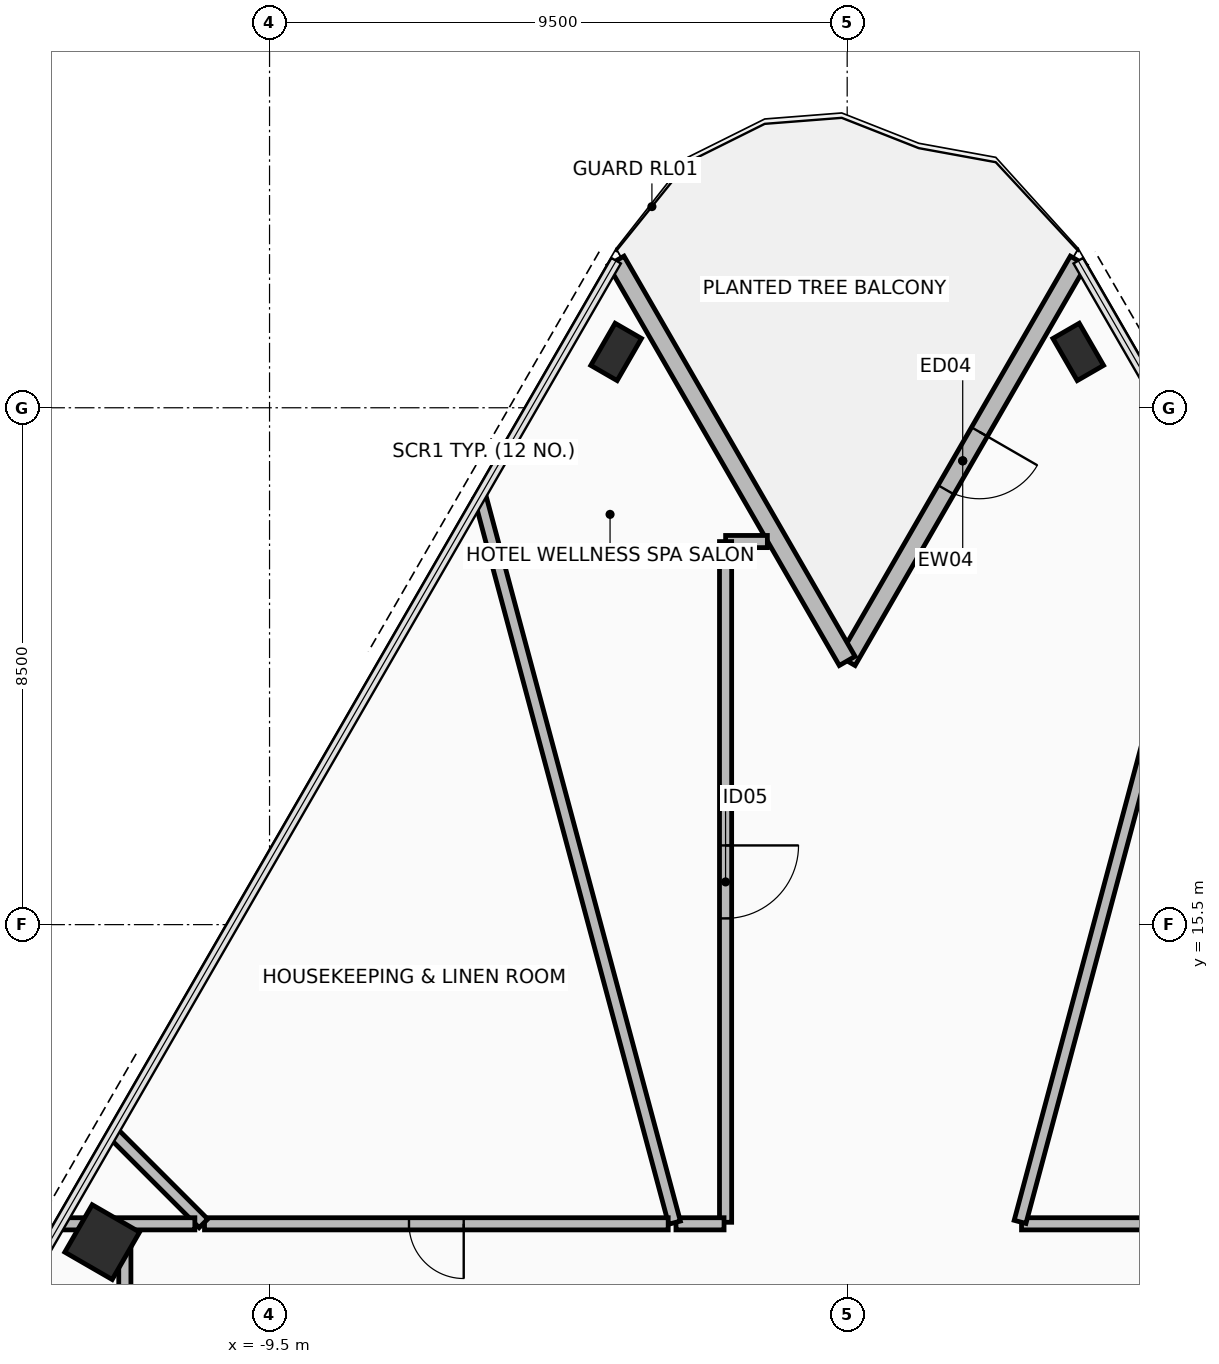
"""IFC4 building model, lengths in metres.
Left out: names, types, materials, properties, quantities, classifications, styles, units other than length and angle.
Written with IfcOpenShell. Run it as: python <this file> out.ifc"""

import sys

from ifc_helpers import new_model, si_unit, direction, frame, frame_2d, origin, origin_2d, place, context, subcontext, project, spatial, rectangle, hollow_rectangle, extrude, element, fill, save


model = new_model("IFC4")
c1 = context("Model", 3, precision=1e-05, world=origin(), true_north=direction((0.0, 1.0)))
c2 = subcontext(c1, "Body", "Model", "MODEL_VIEW")
j1 = project(units=[si_unit("LENGTHUNIT", "METRE"), si_unit("PLANEANGLEUNIT", "RADIAN")], contexts=[c1])
p1 = place(None, origin())
s1 = spatial("IfcSite", under=j1, at=p1, CompositionType="ELEMENT")
p2 = place(p1, origin())
s2 = spatial("IfcBuilding", under=s1, at=p2, CompositionType="ELEMENT")
p3 = place(p2, frame((0.0, 0.0, 52.25)))
s3 = spatial("IfcBuildingStorey", under=s2, at=p3, CompositionType="ELEMENT", Elevation=52.25)
p4 = place(p3, frame((-3.8, 24.918, 0.0), z_axis=(0.0, 0.0, 1.0), x_axis=(0.500001511499, 0.866024531118, 0.0)))
e1 = element("IfcColumn", 1, at=p4, inside=s3, PredefinedType="COLUMN", context=c2, shape_type="SweptSolid", body=[
    extrude(hollow_rectangle(XDim=0.5, YDim=0.8, WallThickness=0.04, at=origin_2d()), origin(), (0.0, 0.0, 1.0), 4.75),
])
p5 = place(p3, frame((-12.252, 10.279, 0.0), z_axis=(0.0, 0.0, 1.0), x_axis=(0.500001511499, 0.866024531118, 0.0)))
e2 = element("IfcColumn", 2, at=p5, inside=s3, PredefinedType="COLUMN", context=c2, shape_type="SweptSolid", body=[
    extrude(hollow_rectangle(XDim=0.9, YDim=0.9, WallThickness=0.05, at=origin_2d()), origin(), (0.0, 0.0, 1.0), 4.75),
])
p6 = place(p3, frame((3.8, 24.918, 0.0), z_axis=(0.0, 0.0, 1.0), x_axis=(-0.500001511499, 0.866024531118, 0.0)))
e3 = element("IfcColumn", 3, at=p6, inside=s3, PredefinedType="COLUMN", context=c2, shape_type="SweptSolid", body=[
    extrude(hollow_rectangle(XDim=0.5, YDim=0.8, WallThickness=0.04, at=origin_2d()), origin(), (0.0, 0.0, 1.0), 4.75),
])
p7 = place(p3, frame((3.8, 26.418, 0.0), z_axis=(0.0, 0.0, 1.0), x_axis=(-0.500005158081, -0.866022425744, 0.0)))
e4 = element("IfcWall", 4, at=p7, inside=s3, PredefinedType="STANDARD", context=c2, shape_type="SweptSolid", body=[
    extrude(rectangle(XDim=7.6, YDim=0.3, at=frame_2d((3.8, 0.0))), origin(), (0.0, 0.0, 1.0), 2.255),
])
p8 = place(p7, frame((3.25, 0.0, 0.0)))
e5 = element("IfcOpeningElement", 5, at=p8, cuts=e4, PredefinedType="OPENING", context=c2, shape_type="SweptSolid", body=[
    extrude(rectangle(XDim=1.1, YDim=2.2, at=frame_2d((0.55, 1.1))), frame((0.0, 0.16, 0.0), z_axis=(0.0, -1.0, 0.0), x_axis=(1.0, 0.0, 0.0)), (0.0, 0.0, 1.0), 0.32),
])
p9 = place(p3, frame((0.0, 19.836, 0.0), z_axis=(0.0, 0.0, 1.0), x_axis=(-0.500005158081, 0.866022425744, 0.0)))
e6 = element("IfcWall", 6, at=p9, inside=s3, PredefinedType="STANDARD", context=c2, shape_type="SweptSolid", body=[
    extrude(rectangle(XDim=7.6, YDim=0.3, at=frame_2d((3.8, 0.0))), origin(), (0.0, 0.0, 1.0), 2.255),
])
p10 = place(p3, frame((10.57, 10.58, 0.0), z_axis=(0.0, 0.0, 1.0), x_axis=(-1.0, 0.0, 0.0)))
e7 = element("IfcWall", 7, at=p10, inside=s3, PredefinedType="PARTITIONING", context=c2, shape_type="SweptSolid", body=[
    extrude(rectangle(XDim=7.702, YDim=0.2, at=frame_2d((3.851, 0.0))), origin(), (0.0, 0.0, 1.0), 2.355),
])
p11 = place(p10, frame((3.351, 0.0, 0.0)))
e8 = element("IfcOpeningElement", 8, at=p11, cuts=e7, PredefinedType="OPENING", context=c2, shape_type="SweptSolid", body=[
    extrude(rectangle(XDim=1.0, YDim=2.15, at=frame_2d((0.5, 1.075))), frame((0.0, 0.11, 0.0), z_axis=(0.0, -1.0, 0.0), x_axis=(1.0, 0.0, 0.0)), (0.0, 0.0, 1.0), 0.22),
])
p12 = place(p3, frame((2.843, 10.612, 0.0), z_axis=(0.0, 0.0, 1.0), x_axis=(0.258820414837, 0.965925459269, 0.0)))
e9 = element("IfcWall", 9, at=p12, inside=s3, PredefinedType="PARTITIONING", context=c2, shape_type="SweptSolid", body=[
    extrude(rectangle(XDim=12.348, YDim=0.2, at=frame_2d((6.174, 0.0))), origin(), (0.0, 0.0, 1.0), 2.255),
])
p13 = place(p3, frame((-1.313, 21.8, 0.0), z_axis=(0.0, 0.0, 1.0), x_axis=(-1.0, 0.0, 0.0)))
e10 = element("IfcWall", 10, at=p13, inside=s3, PredefinedType="PARTITIONING", context=c2, shape_type="SweptSolid", body=[
    extrude(rectangle(XDim=0.687, YDim=0.2, at=frame_2d((0.343, 0.0))), origin(), (0.0, 0.0, 1.0), 4.56),
])
p14 = place(p3, frame((-2.0, 21.799, 0.0), z_axis=(0.0, 0.0, 1.0), x_axis=(0.0, -1.0, 0.0)))
e11 = element("IfcWall", 11, at=p14, inside=s3, PredefinedType="PARTITIONING", context=c2, shape_type="SweptSolid", body=[
    extrude(rectangle(XDim=11.194, YDim=0.2, at=frame_2d((5.597, 0.0))), origin(), (0.0, 0.0, 1.0), 2.355),
])
p15 = place(p14, frame((4.997, 0.0, 0.0)))
e12 = element("IfcOpeningElement", 12, at=p15, cuts=e11, PredefinedType="OPENING", context=c2, shape_type="SweptSolid", body=[
    extrude(rectangle(XDim=1.2, YDim=2.15, at=frame_2d((0.6, 1.075))), frame((0.0, 0.11, 0.0), z_axis=(0.0, -1.0, 0.0), x_axis=(1.0, 0.0, 0.0)), (0.0, 0.0, 1.0), 0.22),
])
p16 = place(p3, frame((-2.025, 10.58, 0.0), z_axis=(0.0, 0.0, 1.0), x_axis=(-1.0, 0.0, 0.0)))
e13 = element("IfcWall", 13, at=p16, inside=s3, PredefinedType="PARTITIONING", context=c2, shape_type="SweptSolid", body=[
    extrude(rectangle(XDim=0.791, YDim=0.2, at=frame_2d((0.396, 0.0))), origin(), (0.0, 0.0, 1.0), 4.56),
])
p17 = place(p3, frame((-2.84, 10.598, 0.0), z_axis=(0.0, 0.0, 1.0), x_axis=(-0.258811500911, 0.965927847718, 0.0)))
e14 = element("IfcWall", 14, at=p17, inside=s3, PredefinedType="PARTITIONING", context=c2, shape_type="SweptSolid", body=[
    extrude(rectangle(XDim=12.352, YDim=0.2, at=frame_2d((6.176, 0.0))), origin(), (0.0, 0.0, 1.0), 2.255),
])
p18 = place(p3, frame((-2.944, 10.58, 0.0), z_axis=(0.0, 0.0, 1.0), x_axis=(-1.0, 0.0, 0.0)))
e15 = element("IfcWall", 15, at=p18, inside=s3, PredefinedType="PARTITIONING", context=c2, shape_type="SweptSolid", body=[
    extrude(rectangle(XDim=7.626, YDim=0.2, at=frame_2d((3.813, 0.0))), origin(), (0.0, 0.0, 1.0), 3.905),
])
p19 = place(p18, frame((3.363, 0.0, 0.0)))
e16 = element("IfcOpeningElement", 16, at=p19, cuts=e15, PredefinedType="OPENING", context=c2, shape_type="SweptSolid", body=[
    extrude(rectangle(XDim=0.9, YDim=2.1, at=frame_2d((0.45, 1.05))), frame((0.0, 0.11, 0.0), z_axis=(0.0, -1.0, 0.0), x_axis=(1.0, 0.0, 0.0)), (0.0, 0.0, 1.0), 0.22),
])
p20 = place(p3, frame((-10.587, 10.587, 0.0), z_axis=(0.0, 0.0, 1.0), x_axis=(-0.707106781187, 0.707106781187, 0.0)))
e17 = element("IfcWall", 17, at=p20, inside=s3, PredefinedType="PARTITIONING", context=c2, shape_type="SweptSolid", body=[
    extrude(rectangle(XDim=2.09, YDim=0.2, at=frame_2d((1.045, 0.0))), origin(), (0.0, 0.0, 1.0), 2.255),
])
p21 = place(p3, frame((-10.729, 10.58, 0.0), z_axis=(0.0, 0.0, 1.0), x_axis=(-1.0, 0.0, 0.0)))
e18 = element("IfcWall", 18, at=p21, inside=s3, PredefinedType="PARTITIONING", context=c2, shape_type="SweptSolid", body=[
    extrude(rectangle(XDim=2.216, YDim=0.2, at=frame_2d((1.108, 0.0))), origin(), (0.0, 0.0, 1.0), 2.255),
])
p22 = place(p3, frame((-11.88, 10.475, 0.0), z_axis=(0.0, 0.0, 1.0), x_axis=(0.0, -1.0, 0.0)))
e19 = element("IfcWall", 19, at=p22, inside=s3, PredefinedType="PARTITIONING", context=c2, shape_type="SweptSolid", body=[
    extrude(rectangle(XDim=7.259, YDim=0.2, at=frame_2d((3.63, 0.0))), origin(), (0.0, 0.0, 1.0), 2.255),
])
p23 = place(p22, frame((3.03, 0.0, 0.0)))
e20 = element("IfcOpeningElement", 20, at=p23, cuts=e19, PredefinedType="OPENING", context=c2, shape_type="SweptSolid", body=[
    extrude(rectangle(XDim=1.2, YDim=2.15, at=frame_2d((0.6, 1.075))), frame((0.0, 0.11, 0.0), z_axis=(0.0, -1.0, 0.0), x_axis=(1.0, 0.0, 0.0)), (0.0, 0.0, 1.0), 0.22),
])
p24 = place(p8, origin())
e21 = element("IfcDoor", 21, at=p24, inside=s3, OperationType="SINGLE_SWING_LEFT", PredefinedType="DOOR", context=c2, shape_type="SweptSolid", body=[
    extrude(rectangle(XDim=1.1, YDim=2.2, at=frame_2d((0.55, 1.1))), frame((0.0, 0.025, 0.0), z_axis=(0.0, -1.0, 0.0), x_axis=(1.0, 0.0, 0.0)), (0.0, 0.0, 1.0), 0.05),
])
fill(e5, e21)
p25 = place(p15, origin())
e22 = element("IfcDoor", 22, at=p25, inside=s3, OperationType="SINGLE_SWING_LEFT", PredefinedType="DOOR", context=c2, shape_type="SweptSolid", body=[
    extrude(rectangle(XDim=1.2, YDim=2.15, at=frame_2d((0.6, 1.075))), frame((0.0, 0.025, 0.0), z_axis=(0.0, -1.0, 0.0), x_axis=(1.0, 0.0, 0.0)), (0.0, 0.0, 1.0), 0.05),
])
fill(e12, e22)
p26 = place(p19, origin())
e23 = element("IfcDoor", 23, at=p26, inside=s3, OperationType="SINGLE_SWING_LEFT", PredefinedType="DOOR", context=c2, shape_type="SweptSolid", body=[
    extrude(rectangle(XDim=0.9, YDim=2.1, at=frame_2d((0.45, 1.05))), frame((0.0, 0.025, 0.0), z_axis=(0.0, -1.0, 0.0), x_axis=(1.0, 0.0, 0.0)), (0.0, 0.0, 1.0), 0.05),
])
fill(e16, e23)
save(model, sys.argv[1])
